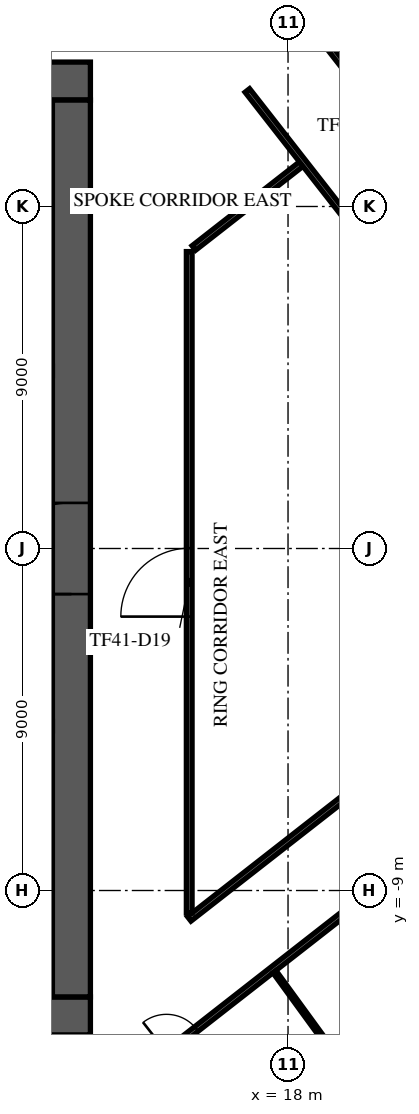
"""IFC4 building model, lengths in metres.
Left out: names, types, materials, properties, quantities, classifications, styles, units other than length and angle.
Written with IfcOpenShell. Run it as: python <this file> out.ifc"""

import sys

from ifc_helpers import new_model, si_unit, direction, frame, frame_2d, origin, place, context, subcontext, project, spatial, rectangle, extrude, element, fill, save


model = new_model("IFC4")
c1 = context("Model", 3, precision=1e-05, world=origin(), true_north=direction((0.0, 1.0)))
c2 = subcontext(c1, "Body", "Model", "MODEL_VIEW")
j1 = project(units=[si_unit("LENGTHUNIT", "METRE"), si_unit("PLANEANGLEUNIT", "RADIAN")], contexts=[c1])
p1 = place(None, origin())
s1 = spatial("IfcSite", under=j1, at=p1, CompositionType="ELEMENT")
p2 = place(p1, origin())
s2 = spatial("IfcBuilding", under=s1, at=p2, CompositionType="ELEMENT")
p3 = place(p2, frame((0.0, 0.0, 175.7)))
s3 = spatial("IfcBuildingStorey", under=s2, at=p3, CompositionType="ELEMENT", Elevation=175.7)
p4 = place(p3, frame((-12.8, 12.3, 0.0), z_axis=(0.0, 0.0, 1.0), x_axis=(1.0, 0.0, 0.0)))
e1 = element("IfcWall", 1, at=p4, inside=s3, PredefinedType="SHEAR", context=c2, shape_type="SweptSolid", body=[
    extrude(rectangle(XDim=25.6, YDim=1.0, at=frame_2d((12.8, 0.0))), origin(), (0.0, 0.0, 1.0), 3.6),
])
p5 = place(p4, frame((11.6, 0.0, 0.0)))
e2 = element("IfcOpeningElement", 2, at=p5, cuts=e1, PredefinedType="OPENING", context=c2, shape_type="SweptSolid", body=[
    extrude(rectangle(XDim=2.4, YDim=2.4, at=frame_2d((1.2, 1.2))), frame((0.0, 0.51, 0.0), z_axis=(0.0, -1.0, 0.0), x_axis=(1.0, 0.0, 0.0)), (0.0, 0.0, 1.0), 1.02),
])
p6 = place(p4, frame((22.425, 0.0, 0.0)))
e3 = element("IfcOpeningElement", 3, at=p6, cuts=e1, PredefinedType="OPENING", context=c2, shape_type="SweptSolid", body=[
    extrude(rectangle(XDim=1.2, YDim=2.1, at=frame_2d((0.6, 1.05))), frame((0.0, 0.51, 0.0), z_axis=(0.0, -1.0, 0.0), x_axis=(1.0, 0.0, 0.0)), (0.0, 0.0, 1.0), 1.02),
])
p7 = place(p4, frame((1.4, 0.0, 0.0)))
e4 = element("IfcOpeningElement", 4, at=p7, cuts=e1, PredefinedType="OPENING", context=c2, shape_type="SweptSolid", body=[
    extrude(rectangle(XDim=1.0, YDim=2.1, at=frame_2d((0.5, 1.05))), frame((0.0, 0.51, 0.0), z_axis=(0.0, -1.0, 0.0), x_axis=(1.0, 0.0, 0.0)), (0.0, 0.0, 1.0), 1.02),
])
p8 = place(p3, frame((-12.8, -12.3, 0.0), z_axis=(0.0, 0.0, 1.0), x_axis=(1.0, 0.0, 0.0)))
e5 = element("IfcWall", 5, at=p8, inside=s3, PredefinedType="SHEAR", context=c2, shape_type="SweptSolid", body=[
    extrude(rectangle(XDim=25.6, YDim=1.0, at=frame_2d((12.8, 0.0))), origin(), (0.0, 0.0, 1.0), 3.6),
])
p9 = place(p8, frame((7.7, 0.0, 0.0)))
e6 = element("IfcOpeningElement", 6, at=p9, cuts=e5, PredefinedType="OPENING", context=c2, shape_type="SweptSolid", body=[
    extrude(rectangle(XDim=2.0, YDim=2.1, at=frame_2d((1.0, 1.05))), frame((0.0, 0.51, 0.0), z_axis=(0.0, -1.0, 0.0), x_axis=(1.0, 0.0, 0.0)), (0.0, 0.0, 1.0), 1.02),
])
p10 = place(p8, frame((17.825, 0.0, 0.0)))
e7 = element("IfcOpeningElement", 7, at=p10, cuts=e5, PredefinedType="OPENING", context=c2, shape_type="SweptSolid", body=[
    extrude(rectangle(XDim=1.2, YDim=2.1, at=frame_2d((0.6, 1.05))), frame((0.0, 0.51, 0.0), z_axis=(0.0, -1.0, 0.0), x_axis=(1.0, 0.0, 0.0)), (0.0, 0.0, 1.0), 1.02),
])
p11 = place(p8, frame((1.975, 0.0, 0.0)))
e8 = element("IfcOpeningElement", 8, at=p11, cuts=e5, PredefinedType="OPENING", context=c2, shape_type="SweptSolid", body=[
    extrude(rectangle(XDim=1.2, YDim=2.1, at=frame_2d((0.6, 1.05))), frame((0.0, 0.51, 0.0), z_axis=(0.0, -1.0, 0.0), x_axis=(1.0, 0.0, 0.0)), (0.0, 0.0, 1.0), 1.02),
])
p12 = place(p8, frame((22.425, 0.0, 0.0)))
e9 = element("IfcOpeningElement", 9, at=p12, cuts=e5, PredefinedType="OPENING", context=c2, shape_type="SweptSolid", body=[
    extrude(rectangle(XDim=1.2, YDim=2.1, at=frame_2d((0.6, 1.05))), frame((0.0, 0.51, 0.0), z_axis=(0.0, -1.0, 0.0), x_axis=(1.0, 0.0, 0.0)), (0.0, 0.0, 1.0), 1.02),
])
p13 = place(p3, frame((12.3, -11.8, 0.0), z_axis=(0.0, 0.0, 1.0), x_axis=(0.0, 1.0, 0.0)))
e10 = element("IfcWall", 10, at=p13, inside=s3, PredefinedType="SHEAR", context=c2, shape_type="SweptSolid", body=[
    extrude(rectangle(XDim=23.6, YDim=1.0, at=frame_2d((11.8, 0.0))), origin(), (0.0, 0.0, 1.0), 3.6),
])
p14 = place(p13, frame((10.6, 0.0, 0.0)))
e11 = element("IfcOpeningElement", 11, at=p14, cuts=e10, PredefinedType="OPENING", context=c2, shape_type="SweptSolid", body=[
    extrude(rectangle(XDim=2.4, YDim=2.4, at=frame_2d((1.2, 1.2))), frame((0.0, 0.51, 0.0), z_axis=(0.0, -1.0, 0.0), x_axis=(1.0, 0.0, 0.0)), (0.0, 0.0, 1.0), 1.02),
])
for number, where, z_axis, x_axis in (
    (12, (8.65, 4.675, 0.0), (0.0, 0.0, 1.0), (1.0, 0.0, 0.0)),
    (13, (8.65, -4.675, 0.0), (0.0, 0.0, 1.0), (1.0, 0.0, 0.0)),
):
    element("IfcWall", number, at=place(p3, frame(where, z_axis=z_axis, x_axis=x_axis)), inside=s3, PredefinedType="SOLIDWALL", context=c2, shape_type="SweptSolid", body=[
        extrude(rectangle(XDim=3.15, YDim=0.25, at=frame_2d((1.575, 0.0))), origin(), (0.0, 0.0, 1.0), 3.6),
    ])
p15 = place(p3, frame((-3.534, -35.882, 0.0), z_axis=(0.0, 0.0, 1.0), x_axis=(0.788011205374, 0.61566089709, 0.0)))
e14 = element("IfcWall", 14, at=p15, inside=s3, PredefinedType="STANDARD", context=c2, shape_type="SweptSolid", body=[
    extrude(rectangle(XDim=49.752, YDim=0.6, at=frame_2d((24.876, 0.0))), origin(), (0.0, 0.0, 1.0), 3.6),
])
p16 = place(p15, frame((1.161, 0.0, 0.9)))
e15 = element("IfcOpeningElement", 15, at=p16, cuts=e14, PredefinedType="OPENING", context=c2, shape_type="SweptSolid", body=[
    extrude(rectangle(XDim=2.1, YDim=2.1, at=frame_2d((1.05, 1.05))), frame((0.0, 0.31, 0.0), z_axis=(0.0, -1.0, 0.0), x_axis=(1.0, 0.0, 0.0)), (0.0, 0.0, 1.0), 0.62),
])
p17 = place(p15, frame((5.644, 0.0, 0.9)))
e16 = element("IfcOpeningElement", 16, at=p17, cuts=e14, PredefinedType="OPENING", context=c2, shape_type="SweptSolid", body=[
    extrude(rectangle(XDim=2.1, YDim=2.1, at=frame_2d((1.05, 1.05))), frame((0.0, 0.31, 0.0), z_axis=(0.0, -1.0, 0.0), x_axis=(1.0, 0.0, 0.0)), (0.0, 0.0, 1.0), 0.62),
])
p18 = place(p15, frame((10.189, 0.0, 0.9)))
e17 = element("IfcOpeningElement", 17, at=p18, cuts=e14, PredefinedType="OPENING", context=c2, shape_type="SweptSolid", body=[
    extrude(rectangle(XDim=2.1, YDim=2.1, at=frame_2d((1.05, 1.05))), frame((0.0, 0.31, 0.0), z_axis=(0.0, -1.0, 0.0), x_axis=(1.0, 0.0, 0.0)), (0.0, 0.0, 1.0), 0.62),
])
p19 = place(p15, frame((14.735, 0.0, 0.9)))
e18 = element("IfcOpeningElement", 18, at=p19, cuts=e14, PredefinedType="OPENING", context=c2, shape_type="SweptSolid", body=[
    extrude(rectangle(XDim=2.1, YDim=2.1, at=frame_2d((1.05, 1.05))), frame((0.0, 0.31, 0.0), z_axis=(0.0, -1.0, 0.0), x_axis=(1.0, 0.0, 0.0)), (0.0, 0.0, 1.0), 0.62),
])
p20 = place(p15, frame((19.28, 0.0, 0.9)))
e19 = element("IfcOpeningElement", 19, at=p20, cuts=e14, PredefinedType="OPENING", context=c2, shape_type="SweptSolid", body=[
    extrude(rectangle(XDim=2.1, YDim=2.1, at=frame_2d((1.05, 1.05))), frame((0.0, 0.31, 0.0), z_axis=(0.0, -1.0, 0.0), x_axis=(1.0, 0.0, 0.0)), (0.0, 0.0, 1.0), 0.62),
])
p21 = place(p15, frame((23.826, 0.0, 0.9)))
e20 = element("IfcOpeningElement", 20, at=p21, cuts=e14, PredefinedType="OPENING", context=c2, shape_type="SweptSolid", body=[
    extrude(rectangle(XDim=2.1, YDim=2.1, at=frame_2d((1.05, 1.05))), frame((0.0, 0.31, 0.0), z_axis=(0.0, -1.0, 0.0), x_axis=(1.0, 0.0, 0.0)), (0.0, 0.0, 1.0), 0.62),
])
p22 = place(p15, frame((28.371, 0.0, 0.9)))
e21 = element("IfcOpeningElement", 21, at=p22, cuts=e14, PredefinedType="OPENING", context=c2, shape_type="SweptSolid", body=[
    extrude(rectangle(XDim=2.1, YDim=2.1, at=frame_2d((1.05, 1.05))), frame((0.0, 0.31, 0.0), z_axis=(0.0, -1.0, 0.0), x_axis=(1.0, 0.0, 0.0)), (0.0, 0.0, 1.0), 0.62),
])
p23 = place(p15, frame((32.917, 0.0, 0.9)))
e22 = element("IfcOpeningElement", 22, at=p23, cuts=e14, PredefinedType="OPENING", context=c2, shape_type="SweptSolid", body=[
    extrude(rectangle(XDim=2.1, YDim=2.1, at=frame_2d((1.05, 1.05))), frame((0.0, 0.31, 0.0), z_axis=(0.0, -1.0, 0.0), x_axis=(1.0, 0.0, 0.0)), (0.0, 0.0, 1.0), 0.62),
])
p24 = place(p15, frame((37.462, 0.0, 0.9)))
e23 = element("IfcOpeningElement", 23, at=p24, cuts=e14, PredefinedType="OPENING", context=c2, shape_type="SweptSolid", body=[
    extrude(rectangle(XDim=2.1, YDim=2.1, at=frame_2d((1.05, 1.05))), frame((0.0, 0.31, 0.0), z_axis=(0.0, -1.0, 0.0), x_axis=(1.0, 0.0, 0.0)), (0.0, 0.0, 1.0), 0.62),
])
p25 = place(p15, frame((42.008, 0.0, 0.9)))
e24 = element("IfcOpeningElement", 24, at=p25, cuts=e14, PredefinedType="OPENING", context=c2, shape_type="SweptSolid", body=[
    extrude(rectangle(XDim=2.1, YDim=2.1, at=frame_2d((1.05, 1.05))), frame((0.0, 0.31, 0.0), z_axis=(0.0, -1.0, 0.0), x_axis=(1.0, 0.0, 0.0)), (0.0, 0.0, 1.0), 0.62),
])
p26 = place(p15, frame((46.491, 0.0, 0.9)))
e25 = element("IfcOpeningElement", 25, at=p26, cuts=e14, PredefinedType="OPENING", context=c2, shape_type="SweptSolid", body=[
    extrude(rectangle(XDim=2.1, YDim=2.1, at=frame_2d((1.05, 1.05))), frame((0.0, 0.31, 0.0), z_axis=(0.0, -1.0, 0.0), x_axis=(1.0, 0.0, 0.0)), (0.0, 0.0, 1.0), 0.62),
])
p27 = place(p3, frame((36.503, 1.52, 0.0), z_axis=(0.0, 0.0, 1.0), x_axis=(-0.615660779349, 0.788011297363, 0.0)))
e26 = element("IfcWall", 26, at=p27, inside=s3, PredefinedType="STANDARD", context=c2, shape_type="SweptSolid", body=[
    extrude(rectangle(XDim=42.176, YDim=0.6, at=frame_2d((21.088, 0.0))), origin(), (0.0, 0.0, 1.0), 3.6),
])
p28 = place(p27, frame((1.138, 0.0, 0.9)))
e27 = element("IfcOpeningElement", 27, at=p28, cuts=e26, PredefinedType="OPENING", context=c2, shape_type="SweptSolid", body=[
    extrude(rectangle(XDim=2.3, YDim=2.1, at=frame_2d((1.15, 1.05))), frame((0.0, 0.31, 0.0), z_axis=(0.0, -1.0, 0.0), x_axis=(1.0, 0.0, 0.0)), (0.0, 0.0, 1.0), 0.62),
])
p29 = place(p27, frame((5.776, 0.0, 0.9)))
e28 = element("IfcOpeningElement", 28, at=p29, cuts=e26, PredefinedType="OPENING", context=c2, shape_type="SweptSolid", body=[
    extrude(rectangle(XDim=2.3, YDim=2.1, at=frame_2d((1.15, 1.05))), frame((0.0, 0.31, 0.0), z_axis=(0.0, -1.0, 0.0), x_axis=(1.0, 0.0, 0.0)), (0.0, 0.0, 1.0), 0.62),
])
p30 = place(p27, frame((10.476, 0.0, 0.9)))
e29 = element("IfcOpeningElement", 29, at=p30, cuts=e26, PredefinedType="OPENING", context=c2, shape_type="SweptSolid", body=[
    extrude(rectangle(XDim=2.3, YDim=2.1, at=frame_2d((1.15, 1.05))), frame((0.0, 0.31, 0.0), z_axis=(0.0, -1.0, 0.0), x_axis=(1.0, 0.0, 0.0)), (0.0, 0.0, 1.0), 0.62),
])
p31 = place(p27, frame((15.176, 0.0, 0.9)))
e30 = element("IfcOpeningElement", 30, at=p31, cuts=e26, PredefinedType="OPENING", context=c2, shape_type="SweptSolid", body=[
    extrude(rectangle(XDim=2.3, YDim=2.1, at=frame_2d((1.15, 1.05))), frame((0.0, 0.31, 0.0), z_axis=(0.0, -1.0, 0.0), x_axis=(1.0, 0.0, 0.0)), (0.0, 0.0, 1.0), 0.62),
])
p32 = place(p27, frame((19.876, 0.0, 0.9)))
e31 = element("IfcOpeningElement", 31, at=p32, cuts=e26, PredefinedType="OPENING", context=c2, shape_type="SweptSolid", body=[
    extrude(rectangle(XDim=2.3, YDim=2.1, at=frame_2d((1.15, 1.05))), frame((0.0, 0.31, 0.0), z_axis=(0.0, -1.0, 0.0), x_axis=(1.0, 0.0, 0.0)), (0.0, 0.0, 1.0), 0.62),
])
p33 = place(p27, frame((24.576, 0.0, 0.9)))
e32 = element("IfcOpeningElement", 32, at=p33, cuts=e26, PredefinedType="OPENING", context=c2, shape_type="SweptSolid", body=[
    extrude(rectangle(XDim=2.3, YDim=2.1, at=frame_2d((1.15, 1.05))), frame((0.0, 0.31, 0.0), z_axis=(0.0, -1.0, 0.0), x_axis=(1.0, 0.0, 0.0)), (0.0, 0.0, 1.0), 0.62),
])
p34 = place(p27, frame((33.976, 0.0, 0.9)))
e33 = element("IfcOpeningElement", 33, at=p34, cuts=e26, PredefinedType="OPENING", context=c2, shape_type="SweptSolid", body=[
    extrude(rectangle(XDim=2.3, YDim=2.1, at=frame_2d((1.15, 1.05))), frame((0.0, 0.31, 0.0), z_axis=(0.0, -1.0, 0.0), x_axis=(1.0, 0.0, 0.0)), (0.0, 0.0, 1.0), 0.62),
])
p35 = place(p27, frame((38.676, 0.0, 0.9)))
e34 = element("IfcOpeningElement", 34, at=p35, cuts=e26, PredefinedType="OPENING", context=c2, shape_type="SweptSolid", body=[
    extrude(rectangle(XDim=2.3, YDim=2.1, at=frame_2d((1.15, 1.05))), frame((0.0, 0.31, 0.0), z_axis=(0.0, -1.0, 0.0), x_axis=(1.0, 0.0, 0.0)), (0.0, 0.0, 1.0), 0.62),
])
p36 = place(p3, frame((-0.348, -25.095, 0.0), z_axis=(0.0, 0.0, 1.0), x_axis=(0.788010131951, 0.615662271008, 0.0)))
e35 = element("IfcWall", 35, at=p36, inside=s3, PredefinedType="PARTITIONING", context=c2, shape_type="SweptSolid", body=[
    extrude(rectangle(XDim=31.448, YDim=0.15, at=frame_2d((15.724, 0.0))), origin(), (0.0, 0.0, 1.0), 3.15),
])
p37 = place(p36, frame((4.801, 0.0, 0.0)))
e36 = element("IfcOpeningElement", 36, at=p37, cuts=e35, PredefinedType="OPENING", context=c2, shape_type="SweptSolid", body=[
    extrude(rectangle(XDim=1.8, YDim=2.1, at=frame_2d((0.9, 1.05))), frame((0.0, 0.085, 0.0), z_axis=(0.0, -1.0, 0.0), x_axis=(1.0, 0.0, 0.0)), (0.0, 0.0, 1.0), 0.17),
])
p38 = place(p36, frame((0.301, 0.0, 0.0)))
e37 = element("IfcOpeningElement", 37, at=p38, cuts=e35, PredefinedType="OPENING", context=c2, shape_type="SweptSolid", body=[
    extrude(rectangle(XDim=1.0, YDim=2.1, at=frame_2d((0.5, 1.05))), frame((0.0, 0.085, 0.0), z_axis=(0.0, -1.0, 0.0), x_axis=(1.0, 0.0, 0.0)), (0.0, 0.0, 1.0), 0.17),
])
p39 = place(p36, frame((19.226, 0.0, 0.0)))
e38 = element("IfcOpeningElement", 38, at=p39, cuts=e35, PredefinedType="OPENING", context=c2, shape_type="SweptSolid", body=[
    extrude(rectangle(XDim=1.0, YDim=2.1, at=frame_2d((0.5, 1.05))), frame((0.0, 0.085, 0.0), z_axis=(0.0, -1.0, 0.0), x_axis=(1.0, 0.0, 0.0)), (0.0, 0.0, 1.0), 0.17),
])
p40 = place(p36, frame((30.072, 0.0, 0.0)))
e39 = element("IfcOpeningElement", 39, at=p40, cuts=e35, PredefinedType="OPENING", context=c2, shape_type="SweptSolid", body=[
    extrude(rectangle(XDim=1.0, YDim=2.1, at=frame_2d((0.5, 1.05))), frame((0.0, 0.085, 0.0), z_axis=(0.0, -1.0, 0.0), x_axis=(1.0, 0.0, 0.0)), (0.0, 0.0, 1.0), 0.17),
])
p41 = place(p3, frame((9.713, 25.187, 0.0), z_axis=(0.0, 0.0, 1.0), x_axis=(0.615659714696, -0.788012129158, 0.0)))
e40 = element("IfcWall", 40, at=p41, inside=s3, PredefinedType="PARTITIONING", context=c2, shape_type="SweptSolid", body=[
    extrude(rectangle(XDim=27.811, YDim=0.15, at=frame_2d((13.905, 0.0))), origin(), (0.0, 0.0, 1.0), 3.15),
])
p42 = place(p41, frame((8.299, 0.0, 0.0)))
e41 = element("IfcOpeningElement", 41, at=p42, cuts=e40, PredefinedType="OPENING", context=c2, shape_type="SweptSolid", body=[
    extrude(rectangle(XDim=1.0, YDim=2.1, at=frame_2d((0.5, 1.05))), frame((0.0, 0.085, 0.0), z_axis=(0.0, -1.0, 0.0), x_axis=(1.0, 0.0, 0.0)), (0.0, 0.0, 1.0), 0.17),
])
p43 = place(p41, frame((15.951, 0.0, 0.0)))
e42 = element("IfcOpeningElement", 42, at=p43, cuts=e40, PredefinedType="OPENING", context=c2, shape_type="SweptSolid", body=[
    extrude(rectangle(XDim=1.0, YDim=2.1, at=frame_2d((0.5, 1.05))), frame((0.0, 0.085, 0.0), z_axis=(0.0, -1.0, 0.0), x_axis=(1.0, 0.0, 0.0)), (0.0, 0.0, 1.0), 0.17),
])
p44 = place(p3, frame((15.4, -9.746, 0.0), z_axis=(0.0, 0.0, 1.0), x_axis=(0.787983457068, 0.615696411705, 0.0)))
e43 = element("IfcWall", 43, at=p44, inside=s3, PredefinedType="PARTITIONING", context=c2, shape_type="SweptSolid", body=[
    extrude(rectangle(XDim=9.589, YDim=0.15, at=frame_2d((4.794, 0.0))), origin(), (0.0, 0.0, 1.0), 3.15),
])
p45 = place(p3, frame((15.4, -9.592, 0.0), z_axis=(0.0, 0.0, 1.0), x_axis=(0.0, 1.0, 0.0)))
e44 = element("IfcWall", 44, at=p45, inside=s3, PredefinedType="PARTITIONING", context=c2, shape_type="SweptSolid", body=[
    extrude(rectangle(XDim=17.405, YDim=0.15, at=frame_2d((8.703, 0.0))), origin(), (0.0, 0.0, 1.0), 3.15),
])
p46 = place(p45, frame((7.8, 0.0, 0.0)))
e45 = element("IfcOpeningElement", 45, at=p46, cuts=e44, PredefinedType="OPENING", context=c2, shape_type="SweptSolid", body=[
    extrude(rectangle(XDim=1.8, YDim=2.1, at=frame_2d((0.9, 1.05))), frame((0.0, 0.085, 0.0), z_axis=(0.0, -1.0, 0.0), x_axis=(1.0, 0.0, 0.0)), (0.0, 0.0, 1.0), 0.17),
])
p47 = place(p3, frame((15.521, 7.908, 0.0), z_axis=(0.0, 0.0, 1.0), x_axis=(0.787935399888, 0.615757911524, 0.0)))
e46 = element("IfcWall", 46, at=p47, inside=s3, PredefinedType="PARTITIONING", context=c2, shape_type="SweptSolid", body=[
    extrude(rectangle(XDim=3.661, YDim=0.15, at=frame_2d((1.831, 0.0))), origin(), (0.0, 0.0, 1.0), 3.15),
])
p48 = place(p3, frame((16.929, 12.053, 0.0), z_axis=(0.0, 0.0, 1.0), x_axis=(0.615693171882, -0.787985988516, 0.0)))
e47 = element("IfcWall", 47, at=p48, inside=s3, PredefinedType="PARTITIONING", context=c2, shape_type="SweptSolid", body=[
    extrude(rectangle(XDim=13.018, YDim=0.15, at=frame_2d((6.509, 0.0))), origin(), (0.0, 0.0, 1.0), 3.15),
])
p49 = place(p3, frame((17.643, -11.136, 0.0), z_axis=(0.0, 0.0, 1.0), x_axis=(0.588621430422, -0.808408814677, 0.0)))
e48 = element("IfcWall", 48, at=p49, inside=s3, PredefinedType="PARTITIONING", context=c2, shape_type="SweptSolid", body=[
    extrude(rectangle(XDim=6.164, YDim=0.1, at=frame_2d((3.082, 0.0))), origin(), (0.0, 0.0, 1.0), 2.9),
])
p50 = place(p14, origin())
e49 = element("IfcDoor", 49, at=p50, inside=s3, OperationType="SINGLE_SWING_LEFT", PredefinedType="DOOR", context=c2, shape_type="SweptSolid", body=[
    extrude(rectangle(XDim=2.4, YDim=2.4, at=frame_2d((1.2, 1.2))), frame((0.0, 0.025, 0.0), z_axis=(0.0, -1.0, 0.0), x_axis=(1.0, 0.0, 0.0)), (0.0, 0.0, 1.0), 0.05),
])
fill(e11, e49)
p51 = place(p39, frame((1.0, 0.0, 0.0), z_axis=(0.0, 0.0, 1.0), x_axis=(-1.0, 0.0, 0.0)))
e50 = element("IfcDoor", 50, at=p51, inside=s3, OperationType="SINGLE_SWING_RIGHT", PredefinedType="DOOR", context=c2, shape_type="SweptSolid", body=[
    extrude(rectangle(XDim=1.0, YDim=2.1, at=frame_2d((0.5, 1.05))), frame((0.0, 0.025, 0.0), z_axis=(0.0, -1.0, 0.0), x_axis=(1.0, 0.0, 0.0)), (0.0, 0.0, 1.0), 0.05),
])
fill(e38, e50)
p52 = place(p46, frame((1.8, 0.0, 0.0), z_axis=(0.0, 0.0, 1.0), x_axis=(-1.0, 0.0, 0.0)))
e51 = element("IfcDoor", 51, at=p52, inside=s3, OperationType="DOUBLE_DOOR_SINGLE_SWING", PredefinedType="DOOR", context=c2, shape_type="SweptSolid", body=[
    extrude(rectangle(XDim=1.8, YDim=2.1, at=frame_2d((0.9, 1.05))), frame((0.0, 0.025, 0.0), z_axis=(0.0, -1.0, 0.0), x_axis=(1.0, 0.0, 0.0)), (0.0, 0.0, 1.0), 0.05),
])
fill(e45, e51)
save(model, sys.argv[1])
